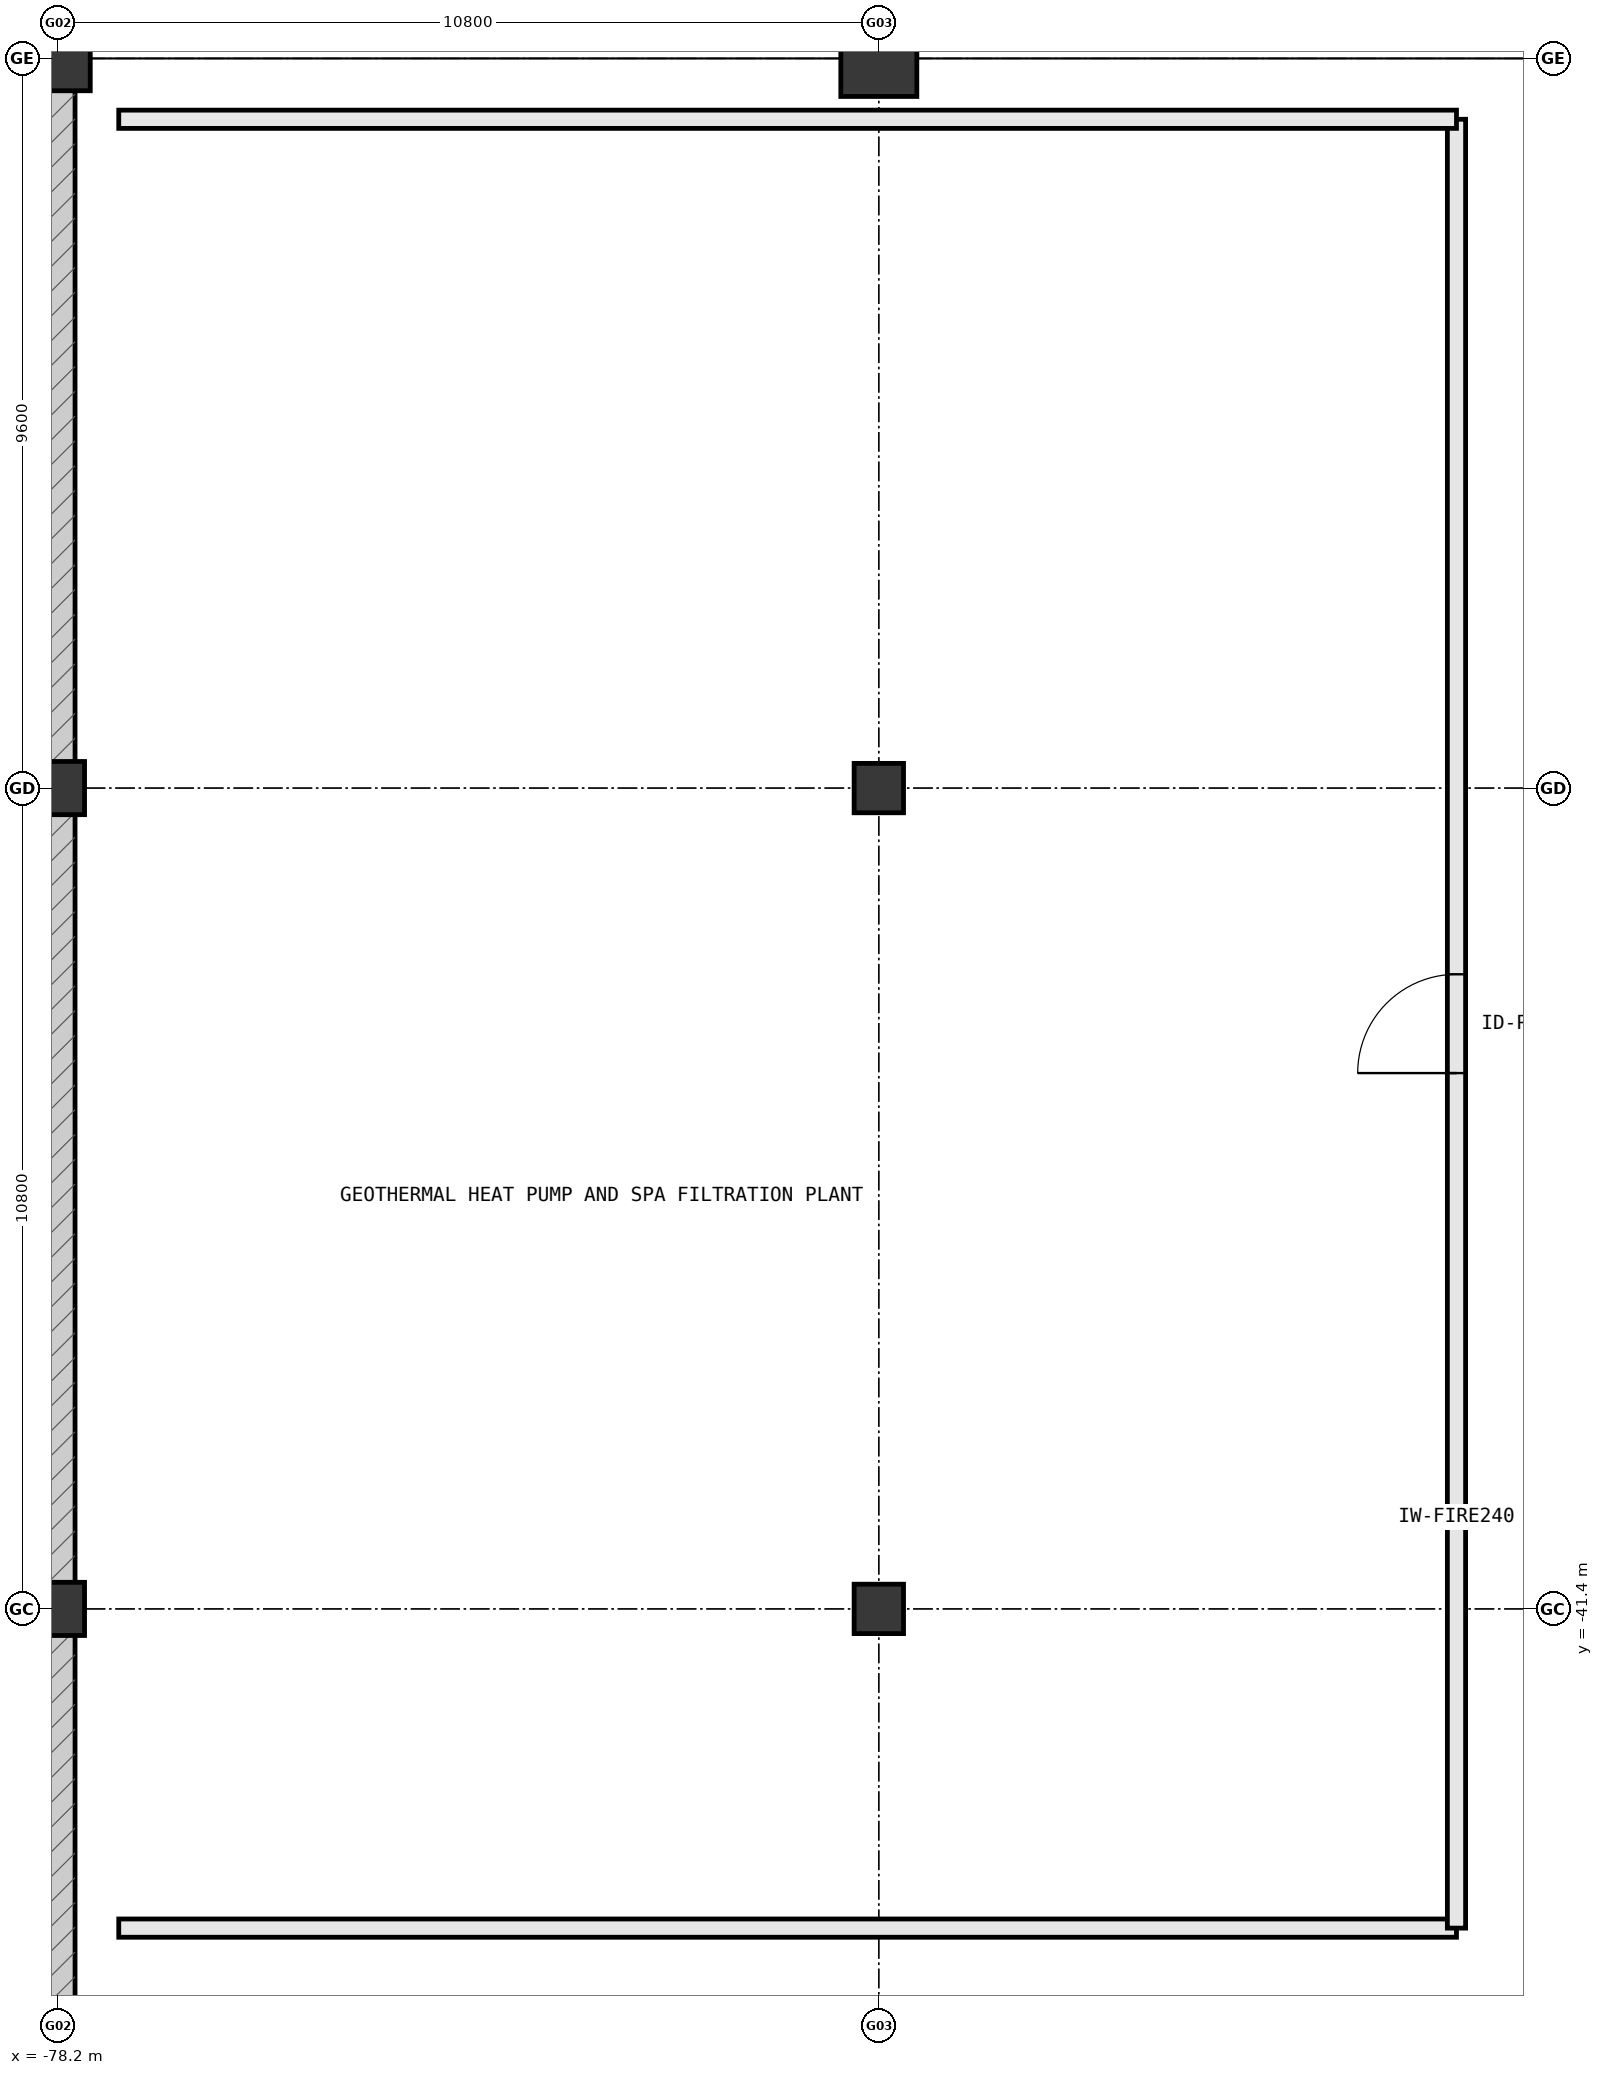
"""IFC4 building model, lengths in metres.
Left out: names, types, materials, properties, quantities, classifications, styles, units other than length and angle.
Written with IfcOpenShell. Run it as: python <this file> out.ifc"""

import sys

from ifc_helpers import new_model, si_unit, direction, frame, frame_2d, origin, origin_2d, place, context, subcontext, project, spatial, rectangle, extrude, element, fill, save


model = new_model("IFC4")
c1 = context("Model", 3, precision=1e-05, world=origin(), true_north=direction((0.0, 1.0)))
c2 = subcontext(c1, "Body", "Model", "MODEL_VIEW")
j1 = project(units=[si_unit("LENGTHUNIT", "METRE"), si_unit("PLANEANGLEUNIT", "RADIAN")], contexts=[c1])
p1 = place(None, origin())
s1 = spatial("IfcSite", under=j1, at=p1, CompositionType="ELEMENT")
p2 = place(p1, origin())
s2 = spatial("IfcBuilding", under=s1, at=p2, CompositionType="ELEMENT")
p3 = place(p2, frame((0.0, 0.0, -4.5)))
s3 = spatial("IfcBuildingStorey", under=s2, at=p3, CompositionType="ELEMENT", Elevation=-4.5)
p4 = place(p3, frame((-78.2, -21.0, 0.0), z_axis=(0.0, 0.0, 1.0), x_axis=(1.0, 0.0, 0.0)))
e1 = element("IfcColumn", 1, at=p4, inside=s3, PredefinedType="COLUMN", context=c2, shape_type="SweptSolid", body=[
    extrude(rectangle(XDim=0.85, YDim=0.85, at=origin_2d()), origin(), (0.0, 0.0, 1.0), 4.5),
])
p5 = place(p3, frame((-67.4, -21.0, 0.0), z_axis=(0.0, 0.0, 1.0), x_axis=(1.0, 0.0, 0.0)))
e2 = element("IfcColumn", 2, at=p5, inside=s3, PredefinedType="COLUMN", context=c2, shape_type="SweptSolid", body=[
    extrude(rectangle(XDim=1.0, YDim=1.0, at=origin_2d()), origin(), (0.0, 0.0, 1.0), 4.5),
])
for number, where, z_axis, x_axis in (
    (3, (-78.2, -41.4, 0.0), (0.0, 0.0, 1.0), (1.0, 0.0, 0.0)),
    (4, (-78.2, -30.6, 0.0), (0.0, 0.0, 1.0), (1.0, 0.0, 0.0)),
):
    element("IfcColumn", number, at=place(p3, frame(where, z_axis=z_axis, x_axis=x_axis)), inside=s3, PredefinedType="COLUMN", context=c2, shape_type="SweptSolid", body=[
        extrude(rectangle(XDim=0.7, YDim=0.7, at=origin_2d()), origin(), (0.0, 0.0, 1.0), 4.5),
    ])
for number, where, z_axis, x_axis in (
    (5, (-67.4, -41.4, 0.0), (0.0, 0.0, 1.0), (1.0, 0.0, 0.0)),
    (6, (-67.4, -30.6, 0.0), (0.0, 0.0, 1.0), (1.0, 0.0, 0.0)),
):
    element("IfcColumn", number, at=place(p3, frame(where, z_axis=z_axis, x_axis=x_axis)), inside=s3, PredefinedType="COLUMN", context=c2, shape_type="SweptSolid", body=[
        extrude(rectangle(XDim=0.65, YDim=0.65, at=origin_2d()), origin(), (0.0, 0.0, 1.0), 4.5),
    ])
p6 = place(p3, frame((-78.2, 27.0, 0.0), z_axis=(0.0, 0.0, 1.0), x_axis=(0.0, -1.0, 0.0)))
e7 = element("IfcWall", 7, at=p6, inside=s3, PredefinedType="USERDEFINED", context=c2, shape_type="SweptSolid", body=[
    extrude(rectangle(XDim=79.2, YDim=0.45, at=frame_2d((39.6, 0.0))), origin(), (0.0, 0.0, 1.0), 4.2),
])
p7 = place(p3, frame((-77.4, -45.6, 0.0), z_axis=(0.0, 0.0, 1.0), x_axis=(1.0, 0.0, 0.0)))
e8 = element("IfcWall", 8, at=p7, inside=s3, PredefinedType="STANDARD", context=c2, shape_type="SweptSolid", body=[
    extrude(rectangle(XDim=17.6, YDim=0.24, at=frame_2d((8.8, 0.0))), origin(), (0.0, 0.0, 1.0), 4.2),
])
p8 = place(p3, frame((-59.8, -45.6, 0.0), z_axis=(0.0, 0.0, 1.0), x_axis=(0.0, 1.0, 0.0)))
e9 = element("IfcWall", 9, at=p8, inside=s3, PredefinedType="STANDARD", context=c2, shape_type="SweptSolid", body=[
    extrude(rectangle(XDim=23.8, YDim=0.24, at=frame_2d((11.9, 0.0))), origin(), (0.0, 0.0, 1.0), 4.2),
])
p9 = place(p8, frame((11.25, 0.0, 0.0)))
e10 = element("IfcOpeningElement", 10, at=p9, cuts=e9, PredefinedType="OPENING", context=c2, shape_type="SweptSolid", body=[
    extrude(rectangle(XDim=1.3, YDim=2.2, at=frame_2d((0.65, 1.1))), frame((0.0, 0.132, 0.0), z_axis=(0.0, -1.0, 0.0), x_axis=(1.0, 0.0, 0.0)), (0.0, 0.0, 1.0), 0.264),
])
p10 = place(p3, frame((-59.8, -21.8, 0.0), z_axis=(0.0, 0.0, 1.0), x_axis=(-1.0, 0.0, 0.0)))
e11 = element("IfcWall", 11, at=p10, inside=s3, PredefinedType="STANDARD", context=c2, shape_type="SweptSolid", body=[
    extrude(rectangle(XDim=17.6, YDim=0.24, at=frame_2d((8.8, 0.0))), origin(), (0.0, 0.0, 1.0), 4.2),
])
p11 = place(p9, origin())
e12 = element("IfcDoor", 12, at=p11, inside=s3, OperationType="SINGLE_SWING_LEFT", PredefinedType="DOOR", context=c2, shape_type="SweptSolid", body=[
    extrude(rectangle(XDim=1.3, YDim=2.2, at=frame_2d((0.65, 1.1))), frame((0.0, 0.025, 0.0), z_axis=(0.0, -1.0, 0.0), x_axis=(1.0, 0.0, 0.0)), (0.0, 0.0, 1.0), 0.05),
])
fill(e10, e12)
save(model, sys.argv[1])
